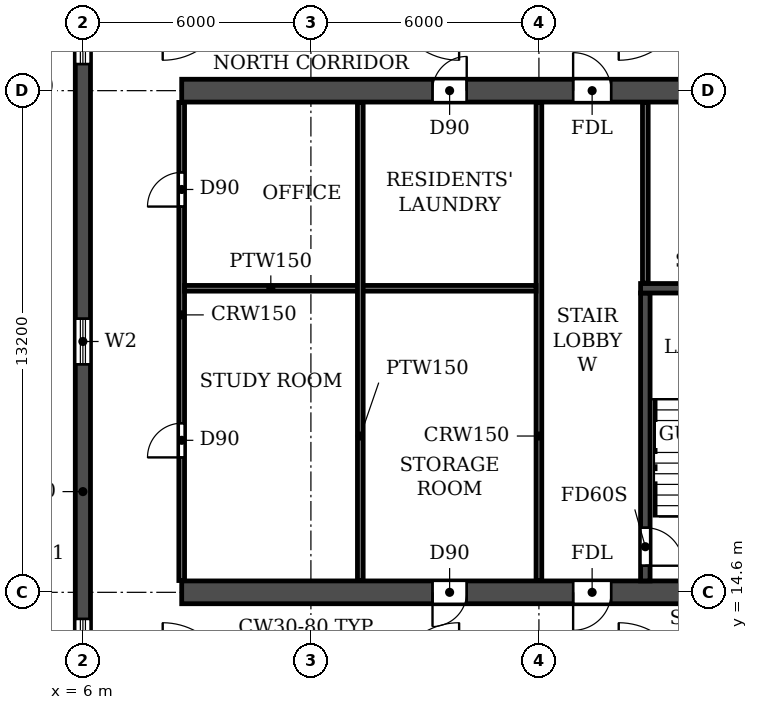
"""IFC4 building model, lengths in metres.
Left out: names, types, materials, properties, quantities, classifications, styles, units other than length and angle.
Written with IfcOpenShell. Run it as: python <this file> out.ifc"""

import sys

from ifc_helpers import new_model, si_unit, direction, frame, frame_2d, origin, place, context, subcontext, project, spatial, rectangle, extrude, element, fill, save


model = new_model("IFC4")
c1 = context("Model", 3, precision=1e-05, world=origin(), true_north=direction((0.0, 1.0)))
c2 = subcontext(c1, "Body", "Model", "MODEL_VIEW")
j1 = project(units=[si_unit("LENGTHUNIT", "METRE"), si_unit("PLANEANGLEUNIT", "RADIAN")], contexts=[c1])
p1 = place(None, origin())
s1 = spatial("IfcSite", under=j1, at=p1, CompositionType="ELEMENT")
p2 = place(p1, origin())
s2 = spatial("IfcBuilding", under=s1, at=p2, CompositionType="ELEMENT")
p3 = place(p2, frame((0.0, 0.0, 53.1)))
s3 = spatial("IfcBuildingStorey", under=s2, at=p3, CompositionType="ELEMENT", Elevation=53.1)
p4 = place(p3, frame((6.0, 4.683, 0.0), z_axis=(0.0, 0.0, 1.0), x_axis=(0.0, 1.0, 0.0)))
e1 = element("IfcWall", 1, at=p4, inside=s3, PredefinedType="SHEAR", context=c2, shape_type="SweptSolid", body=[
    extrude(rectangle(XDim=35.434, YDim=0.4, at=frame_2d((17.717, 0.0))), origin(), (0.0, 0.0, 1.0), 3.05),
])
p5 = place(p4, frame((23.817, 0.0, 0.9)))
e2 = element("IfcOpeningElement", 2, at=p5, cuts=e1, PredefinedType="OPENING", context=c2, shape_type="SweptSolid", body=[
    extrude(rectangle(XDim=1.2, YDim=1.5, at=frame_2d((0.6, 0.75))), frame((0.0, 0.21, 0.0), z_axis=(0.0, -1.0, 0.0), x_axis=(1.0, 0.0, 0.0)), (0.0, 0.0, 1.0), 0.42),
])
p6 = place(p4, frame((8.017, 0.0, 0.9)))
e3 = element("IfcOpeningElement", 3, at=p6, cuts=e1, PredefinedType="OPENING", context=c2, shape_type="SweptSolid", body=[
    extrude(rectangle(XDim=1.2, YDim=1.5, at=frame_2d((0.6, 0.75))), frame((0.0, 0.21, 0.0), z_axis=(0.0, -1.0, 0.0), x_axis=(1.0, 0.0, 0.0)), (0.0, 0.0, 1.0), 0.42),
])
p7 = place(p4, frame((15.917, 0.0, 0.9)))
e4 = element("IfcOpeningElement", 4, at=p7, cuts=e1, PredefinedType="OPENING", context=c2, shape_type="SweptSolid", body=[
    extrude(rectangle(XDim=1.2, YDim=1.5, at=frame_2d((0.6, 0.75))), frame((0.0, 0.21, 0.0), z_axis=(0.0, -1.0, 0.0), x_axis=(1.0, 0.0, 0.0)), (0.0, 0.0, 1.0), 0.42),
])
p8 = place(p4, frame((30.076, 0.0, 0.0)))
e5 = element("IfcOpeningElement", 5, at=p8, cuts=e1, PredefinedType="OPENING", context=c2, shape_type="SweptSolid", body=[
    extrude(rectangle(XDim=1.0, YDim=2.1, at=frame_2d((0.5, 1.05))), frame((0.0, 0.21, 0.0), z_axis=(0.0, -1.0, 0.0), x_axis=(1.0, 0.0, 0.0)), (0.0, 0.0, 1.0), 0.42),
])
p9 = place(p4, frame((3.159, 0.0, 0.0)))
e6 = element("IfcOpeningElement", 6, at=p9, cuts=e1, PredefinedType="OPENING", context=c2, shape_type="SweptSolid", body=[
    extrude(rectangle(XDim=1.0, YDim=2.1, at=frame_2d((0.5, 1.05))), frame((0.0, 0.21, 0.0), z_axis=(0.0, -1.0, 0.0), x_axis=(1.0, 0.0, 0.0)), (0.0, 0.0, 1.0), 0.42),
])
p10 = place(p3, frame((8.6, 14.6, 0.0), z_axis=(0.0, 0.0, 1.0), x_axis=(1.0, 0.0, 0.0)))
e7 = element("IfcWall", 7, at=p10, inside=s3, PredefinedType="SOLIDWALL", context=c2, shape_type="SweptSolid", body=[
    extrude(rectangle(XDim=84.8, YDim=0.6, at=frame_2d((42.4, 0.0))), origin(), (0.0, 0.0, 1.0), 3.05),
])
p11 = place(p10, frame((6.6, 0.0, 0.0)))
e8 = element("IfcOpeningElement", 8, at=p11, cuts=e7, PredefinedType="OPENING", context=c2, shape_type="SweptSolid", body=[
    extrude(rectangle(XDim=0.9, YDim=2.1, at=frame_2d((0.45, 1.05))), frame((0.0, 0.31, 0.0), z_axis=(0.0, -1.0, 0.0), x_axis=(1.0, 0.0, 0.0)), (0.0, 0.0, 1.0), 0.62),
])
p12 = place(p10, frame((10.3, 0.0, 0.0)))
e9 = element("IfcOpeningElement", 9, at=p12, cuts=e7, PredefinedType="OPENING", context=c2, shape_type="SweptSolid", body=[
    extrude(rectangle(XDim=1.0, YDim=2.1, at=frame_2d((0.5, 1.05))), frame((0.0, 0.31, 0.0), z_axis=(0.0, -1.0, 0.0), x_axis=(1.0, 0.0, 0.0)), (0.0, 0.0, 1.0), 0.62),
])
p13 = place(p10, frame((18.25, 0.0, 0.0)))
e10 = element("IfcOpeningElement", 10, at=p13, cuts=e7, PredefinedType="OPENING", context=c2, shape_type="SweptSolid", body=[
    extrude(rectangle(XDim=0.9, YDim=2.1, at=frame_2d((0.45, 1.05))), frame((0.0, 0.31, 0.0), z_axis=(0.0, -1.0, 0.0), x_axis=(1.0, 0.0, 0.0)), (0.0, 0.0, 1.0), 0.62),
])
p14 = place(p10, frame((22.8, 0.0, 0.0)))
e11 = element("IfcOpeningElement", 11, at=p14, cuts=e7, PredefinedType="OPENING", context=c2, shape_type="SweptSolid", body=[
    extrude(rectangle(XDim=1.0, YDim=2.1, at=frame_2d((0.5, 1.05))), frame((0.0, 0.31, 0.0), z_axis=(0.0, -1.0, 0.0), x_axis=(1.0, 0.0, 0.0)), (0.0, 0.0, 1.0), 0.62),
])
p15 = place(p10, frame((34.1, 0.0, 0.0)))
e12 = element("IfcOpeningElement", 12, at=p15, cuts=e7, PredefinedType="OPENING", context=c2, shape_type="SweptSolid", body=[
    extrude(rectangle(XDim=1.0, YDim=2.1, at=frame_2d((0.5, 1.05))), frame((0.0, 0.31, 0.0), z_axis=(0.0, -1.0, 0.0), x_axis=(1.0, 0.0, 0.0)), (0.0, 0.0, 1.0), 0.62),
])
p16 = place(p10, frame((38.0, 0.0, 0.0)))
e13 = element("IfcOpeningElement", 13, at=p16, cuts=e7, PredefinedType="OPENING", context=c2, shape_type="SweptSolid", body=[
    extrude(rectangle(XDim=1.0, YDim=2.1, at=frame_2d((0.5, 1.05))), frame((0.0, 0.31, 0.0), z_axis=(0.0, -1.0, 0.0), x_axis=(1.0, 0.0, 0.0)), (0.0, 0.0, 1.0), 0.62),
])
p17 = place(p10, frame((41.9, 0.0, 0.0)))
e14 = element("IfcOpeningElement", 14, at=p17, cuts=e7, PredefinedType="OPENING", context=c2, shape_type="SweptSolid", body=[
    extrude(rectangle(XDim=1.0, YDim=2.1, at=frame_2d((0.5, 1.05))), frame((0.0, 0.31, 0.0), z_axis=(0.0, -1.0, 0.0), x_axis=(1.0, 0.0, 0.0)), (0.0, 0.0, 1.0), 0.62),
])
p18 = place(p10, frame((45.8, 0.0, 0.0)))
e15 = element("IfcOpeningElement", 15, at=p18, cuts=e7, PredefinedType="OPENING", context=c2, shape_type="SweptSolid", body=[
    extrude(rectangle(XDim=1.0, YDim=2.1, at=frame_2d((0.5, 1.05))), frame((0.0, 0.31, 0.0), z_axis=(0.0, -1.0, 0.0), x_axis=(1.0, 0.0, 0.0)), (0.0, 0.0, 1.0), 0.62),
])
p19 = place(p10, frame((49.7, 0.0, 0.0)))
e16 = element("IfcOpeningElement", 16, at=p19, cuts=e7, PredefinedType="OPENING", context=c2, shape_type="SweptSolid", body=[
    extrude(rectangle(XDim=1.0, YDim=2.1, at=frame_2d((0.5, 1.05))), frame((0.0, 0.31, 0.0), z_axis=(0.0, -1.0, 0.0), x_axis=(1.0, 0.0, 0.0)), (0.0, 0.0, 1.0), 0.62),
])
p20 = place(p10, frame((61.0, 0.0, 0.0)))
e17 = element("IfcOpeningElement", 17, at=p20, cuts=e7, PredefinedType="OPENING", context=c2, shape_type="SweptSolid", body=[
    extrude(rectangle(XDim=1.0, YDim=2.1, at=frame_2d((0.5, 1.05))), frame((0.0, 0.31, 0.0), z_axis=(0.0, -1.0, 0.0), x_axis=(1.0, 0.0, 0.0)), (0.0, 0.0, 1.0), 0.62),
])
p21 = place(p10, frame((65.65, 0.0, 0.0)))
e18 = element("IfcOpeningElement", 18, at=p21, cuts=e7, PredefinedType="OPENING", context=c2, shape_type="SweptSolid", body=[
    extrude(rectangle(XDim=0.9, YDim=2.1, at=frame_2d((0.45, 1.05))), frame((0.0, 0.31, 0.0), z_axis=(0.0, -1.0, 0.0), x_axis=(1.0, 0.0, 0.0)), (0.0, 0.0, 1.0), 0.62),
])
p22 = place(p10, frame((73.5, 0.0, 0.0)))
e19 = element("IfcOpeningElement", 19, at=p22, cuts=e7, PredefinedType="OPENING", context=c2, shape_type="SweptSolid", body=[
    extrude(rectangle(XDim=1.0, YDim=2.1, at=frame_2d((0.5, 1.05))), frame((0.0, 0.31, 0.0), z_axis=(0.0, -1.0, 0.0), x_axis=(1.0, 0.0, 0.0)), (0.0, 0.0, 1.0), 0.62),
])
p23 = place(p10, frame((77.3, 0.0, 0.0)))
e20 = element("IfcOpeningElement", 20, at=p23, cuts=e7, PredefinedType="OPENING", context=c2, shape_type="SweptSolid", body=[
    extrude(rectangle(XDim=0.9, YDim=2.1, at=frame_2d((0.45, 1.05))), frame((0.0, 0.31, 0.0), z_axis=(0.0, -1.0, 0.0), x_axis=(1.0, 0.0, 0.0)), (0.0, 0.0, 1.0), 0.62),
])
p24 = place(p3, frame((8.6, 27.8, 0.0), z_axis=(0.0, 0.0, 1.0), x_axis=(1.0, 0.0, 0.0)))
e21 = element("IfcWall", 21, at=p24, inside=s3, PredefinedType="SOLIDWALL", context=c2, shape_type="SweptSolid", body=[
    extrude(rectangle(XDim=84.8, YDim=0.6, at=frame_2d((42.4, 0.0))), origin(), (0.0, 0.0, 1.0), 3.05),
])
p25 = place(p24, frame((6.6, 0.0, 0.0)))
e22 = element("IfcOpeningElement", 22, at=p25, cuts=e21, PredefinedType="OPENING", context=c2, shape_type="SweptSolid", body=[
    extrude(rectangle(XDim=0.9, YDim=2.1, at=frame_2d((0.45, 1.05))), frame((0.0, 0.31, 0.0), z_axis=(0.0, -1.0, 0.0), x_axis=(1.0, 0.0, 0.0)), (0.0, 0.0, 1.0), 0.62),
])
p26 = place(p24, frame((10.3, 0.0, 0.0)))
e23 = element("IfcOpeningElement", 23, at=p26, cuts=e21, PredefinedType="OPENING", context=c2, shape_type="SweptSolid", body=[
    extrude(rectangle(XDim=1.0, YDim=2.1, at=frame_2d((0.5, 1.05))), frame((0.0, 0.31, 0.0), z_axis=(0.0, -1.0, 0.0), x_axis=(1.0, 0.0, 0.0)), (0.0, 0.0, 1.0), 0.62),
])
p27 = place(p24, frame((13.65, 0.0, 0.0)))
e24 = element("IfcOpeningElement", 24, at=p27, cuts=e21, PredefinedType="OPENING", context=c2, shape_type="SweptSolid", body=[
    extrude(rectangle(XDim=0.9, YDim=2.1, at=frame_2d((0.45, 1.05))), frame((0.0, 0.31, 0.0), z_axis=(0.0, -1.0, 0.0), x_axis=(1.0, 0.0, 0.0)), (0.0, 0.0, 1.0), 0.62),
])
p28 = place(p24, frame((18.25, 0.0, 0.0)))
e25 = element("IfcOpeningElement", 25, at=p28, cuts=e21, PredefinedType="OPENING", context=c2, shape_type="SweptSolid", body=[
    extrude(rectangle(XDim=0.9, YDim=2.1, at=frame_2d((0.45, 1.05))), frame((0.0, 0.31, 0.0), z_axis=(0.0, -1.0, 0.0), x_axis=(1.0, 0.0, 0.0)), (0.0, 0.0, 1.0), 0.62),
])
p29 = place(p24, frame((22.85, 0.0, 0.0)))
e26 = element("IfcOpeningElement", 26, at=p29, cuts=e21, PredefinedType="OPENING", context=c2, shape_type="SweptSolid", body=[
    extrude(rectangle(XDim=0.9, YDim=2.1, at=frame_2d((0.45, 1.05))), frame((0.0, 0.31, 0.0), z_axis=(0.0, -1.0, 0.0), x_axis=(1.0, 0.0, 0.0)), (0.0, 0.0, 1.0), 0.62),
])
p30 = place(p24, frame((26.0, 0.0, 0.0)))
e27 = element("IfcOpeningElement", 27, at=p30, cuts=e21, PredefinedType="OPENING", context=c2, shape_type="SweptSolid", body=[
    extrude(rectangle(XDim=1.0, YDim=2.1, at=frame_2d((0.5, 1.05))), frame((0.0, 0.31, 0.0), z_axis=(0.0, -1.0, 0.0), x_axis=(1.0, 0.0, 0.0)), (0.0, 0.0, 1.0), 0.62),
])
p31 = place(p24, frame((31.2, 0.0, 0.0)))
e28 = element("IfcOpeningElement", 28, at=p31, cuts=e21, PredefinedType="OPENING", context=c2, shape_type="SweptSolid", body=[
    extrude(rectangle(XDim=1.0, YDim=2.1, at=frame_2d((0.5, 1.05))), frame((0.0, 0.31, 0.0), z_axis=(0.0, -1.0, 0.0), x_axis=(1.0, 0.0, 0.0)), (0.0, 0.0, 1.0), 0.62),
])
p32 = place(p24, frame((39.0, 0.0, 0.0)))
e29 = element("IfcOpeningElement", 29, at=p32, cuts=e21, PredefinedType="OPENING", context=c2, shape_type="SweptSolid", body=[
    extrude(rectangle(XDim=1.0, YDim=2.1, at=frame_2d((0.5, 1.05))), frame((0.0, 0.31, 0.0), z_axis=(0.0, -1.0, 0.0), x_axis=(1.0, 0.0, 0.0)), (0.0, 0.0, 1.0), 0.62),
])
p33 = place(p24, frame((41.9, 0.0, 0.0)))
e30 = element("IfcOpeningElement", 30, at=p33, cuts=e21, PredefinedType="OPENING", context=c2, shape_type="SweptSolid", body=[
    extrude(rectangle(XDim=1.0, YDim=2.1, at=frame_2d((0.5, 1.05))), frame((0.0, 0.31, 0.0), z_axis=(0.0, -1.0, 0.0), x_axis=(1.0, 0.0, 0.0)), (0.0, 0.0, 1.0), 0.62),
])
p34 = place(p24, frame((44.8, 0.0, 0.0)))
e31 = element("IfcOpeningElement", 31, at=p34, cuts=e21, PredefinedType="OPENING", context=c2, shape_type="SweptSolid", body=[
    extrude(rectangle(XDim=1.0, YDim=2.1, at=frame_2d((0.5, 1.05))), frame((0.0, 0.31, 0.0), z_axis=(0.0, -1.0, 0.0), x_axis=(1.0, 0.0, 0.0)), (0.0, 0.0, 1.0), 0.62),
])
p35 = place(p24, frame((48.7, 0.0, 0.0)))
e32 = element("IfcOpeningElement", 32, at=p35, cuts=e21, PredefinedType="OPENING", context=c2, shape_type="SweptSolid", body=[
    extrude(rectangle(XDim=1.0, YDim=2.1, at=frame_2d((0.5, 1.05))), frame((0.0, 0.31, 0.0), z_axis=(0.0, -1.0, 0.0), x_axis=(1.0, 0.0, 0.0)), (0.0, 0.0, 1.0), 0.62),
])
p36 = place(p24, frame((53.65, 0.0, 0.0)))
e33 = element("IfcOpeningElement", 33, at=p36, cuts=e21, PredefinedType="OPENING", context=c2, shape_type="SweptSolid", body=[
    extrude(rectangle(XDim=1.5, YDim=2.1, at=frame_2d((0.75, 1.05))), frame((0.0, 0.31, 0.0), z_axis=(0.0, -1.0, 0.0), x_axis=(1.0, 0.0, 0.0)), (0.0, 0.0, 1.0), 0.62),
])
p37 = place(p24, frame((57.8, 0.0, 0.0)))
e34 = element("IfcOpeningElement", 34, at=p37, cuts=e21, PredefinedType="OPENING", context=c2, shape_type="SweptSolid", body=[
    extrude(rectangle(XDim=1.0, YDim=2.1, at=frame_2d((0.5, 1.05))), frame((0.0, 0.31, 0.0), z_axis=(0.0, -1.0, 0.0), x_axis=(1.0, 0.0, 0.0)), (0.0, 0.0, 1.0), 0.62),
])
p38 = place(p24, frame((61.05, 0.0, 0.0)))
e35 = element("IfcOpeningElement", 35, at=p38, cuts=e21, PredefinedType="OPENING", context=c2, shape_type="SweptSolid", body=[
    extrude(rectangle(XDim=0.9, YDim=2.1, at=frame_2d((0.45, 1.05))), frame((0.0, 0.31, 0.0), z_axis=(0.0, -1.0, 0.0), x_axis=(1.0, 0.0, 0.0)), (0.0, 0.0, 1.0), 0.62),
])
p39 = place(p24, frame((65.65, 0.0, 0.0)))
e36 = element("IfcOpeningElement", 36, at=p39, cuts=e21, PredefinedType="OPENING", context=c2, shape_type="SweptSolid", body=[
    extrude(rectangle(XDim=0.9, YDim=2.1, at=frame_2d((0.45, 1.05))), frame((0.0, 0.31, 0.0), z_axis=(0.0, -1.0, 0.0), x_axis=(1.0, 0.0, 0.0)), (0.0, 0.0, 1.0), 0.62),
])
p40 = place(p24, frame((70.25, 0.0, 0.0)))
e37 = element("IfcOpeningElement", 37, at=p40, cuts=e21, PredefinedType="OPENING", context=c2, shape_type="SweptSolid", body=[
    extrude(rectangle(XDim=0.9, YDim=2.1, at=frame_2d((0.45, 1.05))), frame((0.0, 0.31, 0.0), z_axis=(0.0, -1.0, 0.0), x_axis=(1.0, 0.0, 0.0)), (0.0, 0.0, 1.0), 0.62),
])
p41 = place(p24, frame((73.5, 0.0, 0.0)))
e38 = element("IfcOpeningElement", 38, at=p41, cuts=e21, PredefinedType="OPENING", context=c2, shape_type="SweptSolid", body=[
    extrude(rectangle(XDim=1.0, YDim=2.1, at=frame_2d((0.5, 1.05))), frame((0.0, 0.31, 0.0), z_axis=(0.0, -1.0, 0.0), x_axis=(1.0, 0.0, 0.0)), (0.0, 0.0, 1.0), 0.62),
])
p42 = place(p24, frame((77.3, 0.0, 0.0)))
e39 = element("IfcOpeningElement", 39, at=p42, cuts=e21, PredefinedType="OPENING", context=c2, shape_type="SweptSolid", body=[
    extrude(rectangle(XDim=0.9, YDim=2.1, at=frame_2d((0.45, 1.05))), frame((0.0, 0.31, 0.0), z_axis=(0.0, -1.0, 0.0), x_axis=(1.0, 0.0, 0.0)), (0.0, 0.0, 1.0), 0.62),
])
p43 = place(p3, frame((20.8, 14.9, 0.0), z_axis=(0.0, 0.0, 1.0), x_axis=(0.0, 1.0, 0.0)))
e40 = element("IfcWall", 40, at=p43, inside=s3, PredefinedType="SOLIDWALL", context=c2, shape_type="SweptSolid", body=[
    extrude(rectangle(XDim=7.575, YDim=0.25, at=frame_2d((3.788, 0.0))), origin(), (0.0, 0.0, 1.0), 3.05),
])
p44 = place(p43, frame((0.4, 0.0, 0.0)))
e41 = element("IfcOpeningElement", 41, at=p44, cuts=e40, PredefinedType="OPENING", context=c2, shape_type="SweptSolid", body=[
    extrude(rectangle(XDim=1.0, YDim=2.1, at=frame_2d((0.5, 1.05))), frame((0.0, 0.135, 0.0), z_axis=(0.0, -1.0, 0.0), x_axis=(1.0, 0.0, 0.0)), (0.0, 0.0, 1.0), 0.27),
])
p45 = place(p3, frame((20.675, 22.6, 0.0), z_axis=(0.0, 0.0, 1.0), x_axis=(1.0, 0.0, 0.0)))
e42 = element("IfcWall", 42, at=p45, inside=s3, PredefinedType="SOLIDWALL", context=c2, shape_type="SweptSolid", body=[
    extrude(rectangle(XDim=4.05, YDim=0.25, at=frame_2d((2.025, 0.0))), origin(), (0.0, 0.0, 1.0), 3.05),
])
p46 = place(p3, frame((8.6, 14.91, 0.0), z_axis=(0.0, 0.0, 1.0), x_axis=(0.0, 1.0, 0.0)))
e43 = element("IfcWall", 43, at=p46, inside=s3, PredefinedType="PARTITIONING", context=c2, shape_type="SweptSolid", body=[
    extrude(rectangle(XDim=12.58, YDim=0.15, at=frame_2d((6.29, 0.0))), origin(), (0.0, 0.0, 1.0), 3.05),
])
p47 = place(p46, frame((3.24, 0.0, 0.0)))
e44 = element("IfcOpeningElement", 44, at=p47, cuts=e43, PredefinedType="OPENING", context=c2, shape_type="SweptSolid", body=[
    extrude(rectangle(XDim=0.9, YDim=2.1, at=frame_2d((0.45, 1.05))), frame((0.0, 0.085, 0.0), z_axis=(0.0, -1.0, 0.0), x_axis=(1.0, 0.0, 0.0)), (0.0, 0.0, 1.0), 0.17),
])
p48 = place(p46, frame((9.84, 0.0, 0.0)))
e45 = element("IfcOpeningElement", 45, at=p48, cuts=e43, PredefinedType="OPENING", context=c2, shape_type="SweptSolid", body=[
    extrude(rectangle(XDim=0.9, YDim=2.1, at=frame_2d((0.45, 1.05))), frame((0.0, 0.085, 0.0), z_axis=(0.0, -1.0, 0.0), x_axis=(1.0, 0.0, 0.0)), (0.0, 0.0, 1.0), 0.17),
])
p49 = place(p3, frame((18.0, 14.91, 0.0), z_axis=(0.0, 0.0, 1.0), x_axis=(0.0, 1.0, 0.0)))
e46 = element("IfcWall", 46, at=p49, inside=s3, PredefinedType="PARTITIONING", context=c2, shape_type="SweptSolid", body=[
    extrude(rectangle(XDim=12.58, YDim=0.15, at=frame_2d((6.29, 0.0))), origin(), (0.0, 0.0, 1.0), 3.05),
])
p50 = place(p3, frame((8.675, 22.6, 0.0), z_axis=(0.0, 0.0, 1.0), x_axis=(1.0, 0.0, 0.0)))
e47 = element("IfcWall", 47, at=p50, inside=s3, PredefinedType="PARTITIONING", context=c2, shape_type="SweptSolid", body=[
    extrude(rectangle(XDim=9.25, YDim=0.15, at=frame_2d((4.625, 0.0))), origin(), (0.0, 0.0, 1.0), 3.05),
])
p51 = place(p3, frame((13.3, 14.91, 0.0), z_axis=(0.0, 0.0, 1.0), x_axis=(0.0, 1.0, 0.0)))
e48 = element("IfcWall", 48, at=p51, inside=s3, PredefinedType="PARTITIONING", context=c2, shape_type="SweptSolid", body=[
    extrude(rectangle(XDim=12.58, YDim=0.15, at=frame_2d((6.29, 0.0))), origin(), (0.0, 0.0, 1.0), 3.05),
])
p52 = place(p3, frame((20.8, 22.735, 0.0), z_axis=(0.0, 0.0, 1.0), x_axis=(0.0, 1.0, 0.0)))
e49 = element("IfcWall", 49, at=p52, inside=s3, PredefinedType="PARTITIONING", context=c2, shape_type="SweptSolid", body=[
    extrude(rectangle(XDim=4.755, YDim=0.15, at=frame_2d((2.377, 0.0))), origin(), (0.0, 0.0, 1.0), 3.05),
])
p53 = place(p5, origin())
e50 = element("IfcWindow", 50, at=p53, inside=s3, PartitioningType="SINGLE_PANEL", PredefinedType="WINDOW", context=c2, shape_type="SweptSolid", body=[
    extrude(rectangle(XDim=1.2, YDim=1.5, at=frame_2d((0.6, 0.75))), frame((0.0, 0.03, 0.0), z_axis=(0.0, -1.0, 0.0), x_axis=(1.0, 0.0, 0.0)), (0.0, 0.0, 1.0), 0.06),
])
fill(e2, e50)
p54 = place(p6, origin())
e51 = element("IfcWindow", 51, at=p54, inside=s3, PartitioningType="SINGLE_PANEL", PredefinedType="WINDOW", context=c2, shape_type="SweptSolid", body=[
    extrude(rectangle(XDim=1.2, YDim=1.5, at=frame_2d((0.6, 0.75))), frame((0.0, 0.03, 0.0), z_axis=(0.0, -1.0, 0.0), x_axis=(1.0, 0.0, 0.0)), (0.0, 0.0, 1.0), 0.06),
])
fill(e3, e51)
p55 = place(p7, origin())
e52 = element("IfcWindow", 52, at=p55, inside=s3, PartitioningType="SINGLE_PANEL", PredefinedType="WINDOW", context=c2, shape_type="SweptSolid", body=[
    extrude(rectangle(XDim=1.2, YDim=1.5, at=frame_2d((0.6, 0.75))), frame((0.0, 0.03, 0.0), z_axis=(0.0, -1.0, 0.0), x_axis=(1.0, 0.0, 0.0)), (0.0, 0.0, 1.0), 0.06),
])
fill(e4, e52)
p56 = place(p25, origin())
e53 = element("IfcDoor", 53, at=p56, inside=s3, OperationType="SINGLE_SWING_RIGHT", PredefinedType="DOOR", context=c2, shape_type="SweptSolid", body=[
    extrude(rectangle(XDim=0.9, YDim=2.1, at=frame_2d((0.45, 1.05))), frame((0.0, 0.025, 0.0), z_axis=(0.0, -1.0, 0.0), x_axis=(1.0, 0.0, 0.0)), (0.0, 0.0, 1.0), 0.05),
])
fill(e22, e53)
p57 = place(p26, origin())
e54 = element("IfcDoor", 54, at=p57, inside=s3, OperationType="SINGLE_SWING_LEFT", PredefinedType="DOOR", context=c2, shape_type="SweptSolid", body=[
    extrude(rectangle(XDim=1.0, YDim=2.1, at=frame_2d((0.5, 1.05))), frame((0.0, 0.025, 0.0), z_axis=(0.0, -1.0, 0.0), x_axis=(1.0, 0.0, 0.0)), (0.0, 0.0, 1.0), 0.05),
])
fill(e23, e54)
p58 = place(p11, frame((0.9, 0.0, 0.0), z_axis=(0.0, 0.0, 1.0), x_axis=(-1.0, 0.0, 0.0)))
e55 = element("IfcDoor", 55, at=p58, inside=s3, OperationType="SINGLE_SWING_RIGHT", PredefinedType="DOOR", context=c2, shape_type="SweptSolid", body=[
    extrude(rectangle(XDim=0.9, YDim=2.1, at=frame_2d((0.45, 1.05))), frame((0.0, 0.025, 0.0), z_axis=(0.0, -1.0, 0.0), x_axis=(1.0, 0.0, 0.0)), (0.0, 0.0, 1.0), 0.05),
])
fill(e8, e55)
p59 = place(p12, frame((1.0, 0.0, 0.0), z_axis=(0.0, 0.0, 1.0), x_axis=(-1.0, 0.0, 0.0)))
e56 = element("IfcDoor", 56, at=p59, inside=s3, OperationType="SINGLE_SWING_RIGHT", PredefinedType="DOOR", context=c2, shape_type="SweptSolid", body=[
    extrude(rectangle(XDim=1.0, YDim=2.1, at=frame_2d((0.5, 1.05))), frame((0.0, 0.025, 0.0), z_axis=(0.0, -1.0, 0.0), x_axis=(1.0, 0.0, 0.0)), (0.0, 0.0, 1.0), 0.05),
])
fill(e9, e56)
p60 = place(p47, origin())
e57 = element("IfcDoor", 57, at=p60, inside=s3, OperationType="SINGLE_SWING_LEFT", PredefinedType="DOOR", context=c2, shape_type="SweptSolid", body=[
    extrude(rectangle(XDim=0.9, YDim=2.1, at=frame_2d((0.45, 1.05))), frame((0.0, 0.025, 0.0), z_axis=(0.0, -1.0, 0.0), x_axis=(1.0, 0.0, 0.0)), (0.0, 0.0, 1.0), 0.05),
])
fill(e44, e57)
p61 = place(p48, origin())
e58 = element("IfcDoor", 58, at=p61, inside=s3, OperationType="SINGLE_SWING_LEFT", PredefinedType="DOOR", context=c2, shape_type="SweptSolid", body=[
    extrude(rectangle(XDim=0.9, YDim=2.1, at=frame_2d((0.45, 1.05))), frame((0.0, 0.025, 0.0), z_axis=(0.0, -1.0, 0.0), x_axis=(1.0, 0.0, 0.0)), (0.0, 0.0, 1.0), 0.05),
])
fill(e45, e58)
p62 = place(p44, frame((1.0, 0.0, 0.0), z_axis=(0.0, 0.0, 1.0), x_axis=(-1.0, 0.0, 0.0)))
e59 = element("IfcDoor", 59, at=p62, inside=s3, OperationType="SINGLE_SWING_RIGHT", PredefinedType="DOOR", context=c2, shape_type="SweptSolid", body=[
    extrude(rectangle(XDim=1.0, YDim=2.1, at=frame_2d((0.5, 1.05))), frame((0.0, 0.025, 0.0), z_axis=(0.0, -1.0, 0.0), x_axis=(1.0, 0.0, 0.0)), (0.0, 0.0, 1.0), 0.05),
])
fill(e41, e59)
save(model, sys.argv[1])
